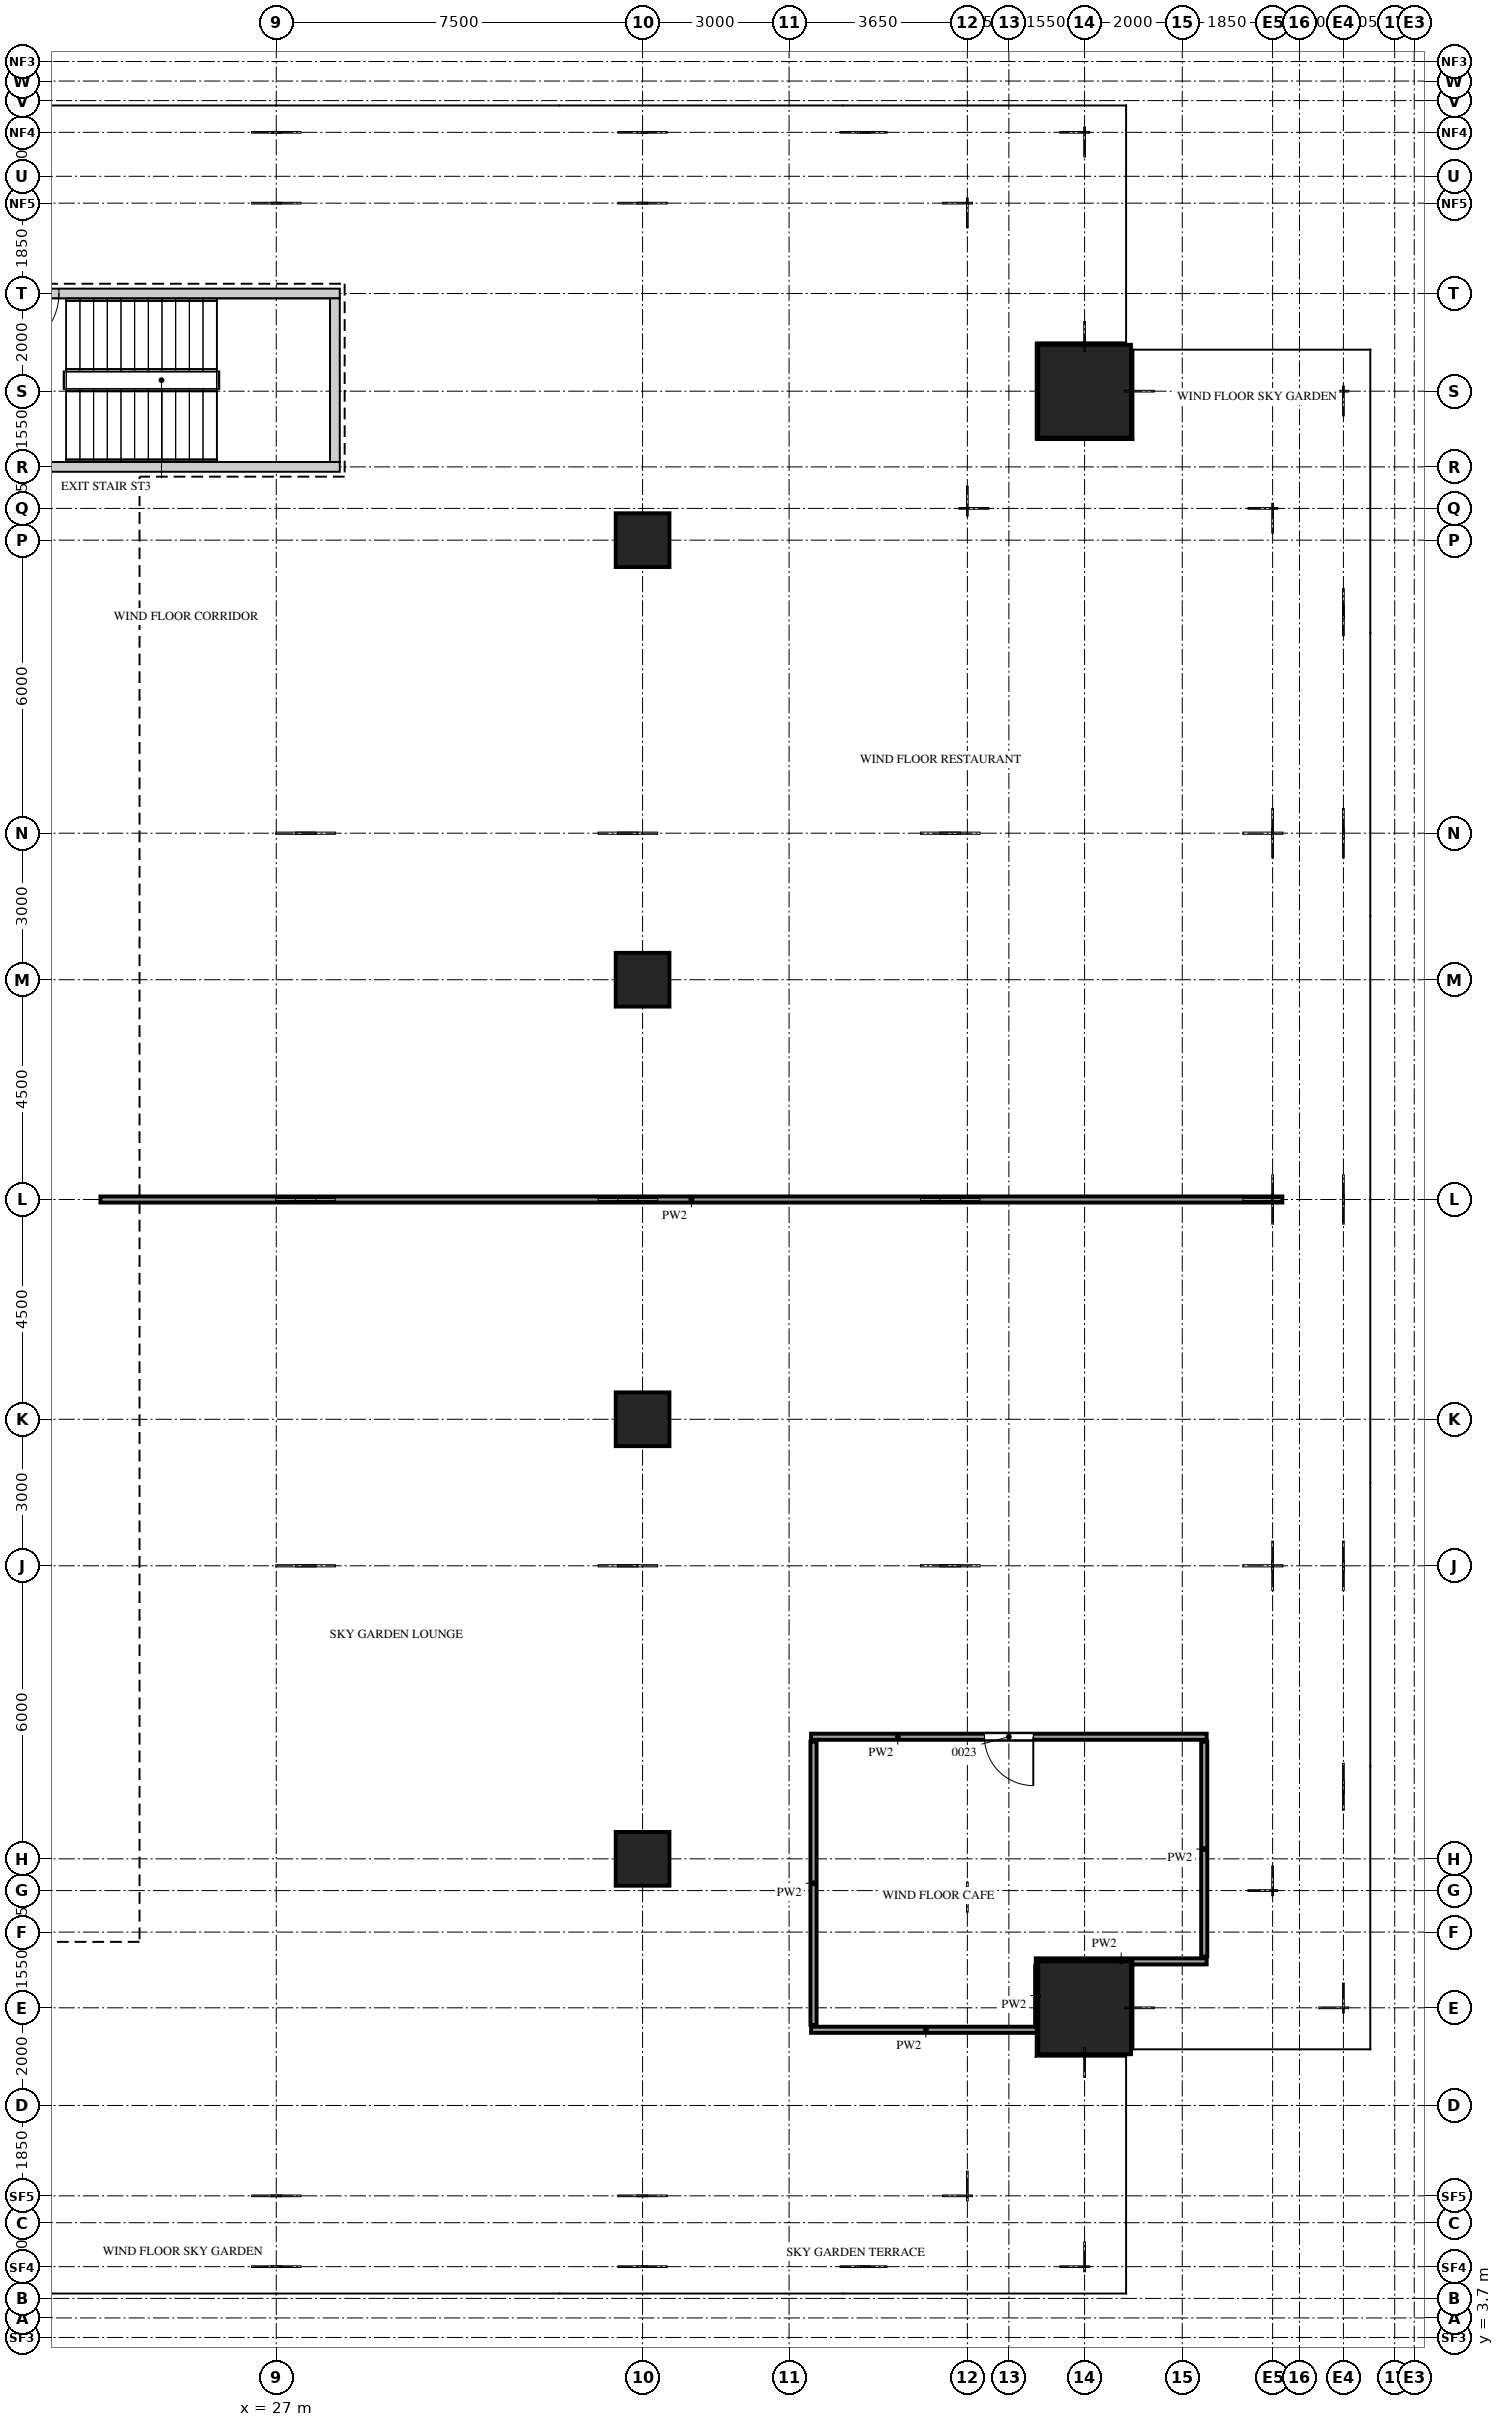
"""IFC4 building model, lengths in metres.
Left out: names, types, materials, properties, quantities, classifications, styles, units other than length and angle.
Written with IfcOpenShell. Run it as: python <this file> out.ifc"""

import sys

from ifc_helpers import new_model, si_unit, direction, frame, frame_2d, origin, origin_2d, place, context, subcontext, project, spatial, rectangle, extrude, source, transform, mapped, element, fill, save


model = new_model("IFC4")
c1 = context("Model", 3, precision=1e-05, world=origin(), true_north=direction((0.0, 1.0)))
c2 = subcontext(c1, "Body", "Model", "MODEL_VIEW")
j1 = project(units=[si_unit("LENGTHUNIT", "METRE"), si_unit("PLANEANGLEUNIT", "RADIAN")], contexts=[c1])
p1 = place(None, origin())
s1 = spatial("IfcSite", under=j1, at=p1, CompositionType="ELEMENT")
p2 = place(p1, origin())
s2 = spatial("IfcBuilding", under=s1, at=p2, CompositionType="ELEMENT")
p3 = place(p2, frame((0.0, 0.0, 274.2)))
s3 = spatial("IfcBuildingStorey", under=s2, at=p3, CompositionType="ELEMENT", Elevation=274.2)
m1 = source(origin(), c2, "Body", "SweptSolid", [
    extrude(rectangle(XDim=7.1, YDim=0.2, at=frame_2d((3.55, 0.0))), origin(), (0.0, 0.0, 1.0), 7.75),
])
p4 = place(p3, frame((21.2, 45.55, 0.0), z_axis=(0.0, 0.0, 1.0), x_axis=(1.0, 0.0, 0.0)))
e1 = element("IfcWall", 1, at=p4, inside=s3, PredefinedType="SHEAR", context=c2, shape_type="MappedRepresentation", body=[
    mapped(m1, transform((0.0, 0.0, 0.0))),
])
m2 = source(origin(), c2, "Body", "SweptSolid", [
    extrude(rectangle(XDim=1.2, YDim=2.1, at=frame_2d((0.6, 1.05))), frame((0.0, 0.11, 0.0), z_axis=(0.0, -1.0, 0.0), x_axis=(1.0, 0.0, 0.0)), (0.0, 0.0, 1.0), 0.22),
])
p5 = place(p4, frame((0.15, 0.0, 0.0)))
e2 = element("IfcOpeningElement", 2, at=p5, cuts=e1, PredefinedType="OPENING", context=c2, shape_type="MappedRepresentation", body=[
    mapped(m2, transform((0.0, 0.0, 0.0))),
])
p6 = place(p3, frame((21.2, 42.0, 0.0), z_axis=(0.0, 0.0, 1.0), x_axis=(1.0, 0.0, 0.0)))
e3 = element("IfcWall", 3, at=p6, inside=s3, PredefinedType="SHEAR", context=c2, shape_type="MappedRepresentation", body=[
    mapped(m1, transform((0.0, 0.0, 0.0))),
])
m3 = source(origin(), c2, "Body", "SweptSolid", [
    extrude(rectangle(XDim=3.35, YDim=0.2, at=frame_2d((1.675, 0.0))), origin(), (0.0, 0.0, 1.0), 7.75),
])
p7 = place(p3, frame((28.2, 42.1, 0.0), z_axis=(0.0, 0.0, 1.0), x_axis=(0.0, 1.0, 0.0)))
e4 = element("IfcWall", 4, at=p7, inside=s3, PredefinedType="SHEAR", context=c2, shape_type="MappedRepresentation", body=[
    mapped(m3, transform((0.0, 0.0, 0.0))),
])
m4 = source(origin(), c2, "Body", "SweptSolid", [
    extrude(rectangle(XDim=1.9, YDim=1.9, at=origin_2d()), origin(), (0.0, 0.0, 1.0), 8.0),
])
for number, where, z_axis, x_axis in (
    (5, (43.55, 43.55, 0.0), (0.0, 0.0, 1.0), (1.0, 0.0, 0.0)),
    (6, (43.55, 10.45, 0.0), (0.0, 0.0, 1.0), (1.0, 0.0, 0.0)),
):
    element("IfcColumn", number, at=place(p3, frame(where, z_axis=z_axis, x_axis=x_axis)), inside=s3, PredefinedType="COLUMN", context=c2, shape_type="MappedRepresentation", body=[
        mapped(m4, transform((0.0, 0.0, 0.0))),
    ])
m5 = source(origin(), c2, "Body", "SweptSolid", [
    extrude(rectangle(XDim=1.1, YDim=1.1, at=origin_2d()), origin(), (0.0, 0.0, 1.0), 7.75),
])
for number, where, z_axis, x_axis in (
    (7, (34.5, 13.5, 0.0), (0.0, 0.0, 1.0), (1.0, 0.0, 0.0)),
    (8, (34.5, 22.5, 0.0), (0.0, 0.0, 1.0), (1.0, 0.0, 0.0)),
    (9, (34.5, 31.5, 0.0), (0.0, 0.0, 1.0), (1.0, 0.0, 0.0)),
    (10, (34.5, 40.5, 0.0), (0.0, 0.0, 1.0), (1.0, 0.0, 0.0)),
):
    element("IfcColumn", number, at=place(p3, frame(where, z_axis=z_axis, x_axis=x_axis)), inside=s3, PredefinedType="COLUMN", context=c2, shape_type="MappedRepresentation", body=[
        mapped(m5, transform((0.0, 0.0, 0.0))),
    ])
m6 = source(origin(), c2, "Body", "SweptSolid", [
    extrude(rectangle(XDim=4.7, YDim=0.125, at=frame_2d((2.35, 0.0))), origin(), (0.0, 0.0, 1.0), 7.75),
])
p8 = place(p3, frame((37.95, 10.0, 0.0), z_axis=(0.0, 0.0, 1.0), x_axis=(1.0, 0.0, 0.0)))
e11 = element("IfcWall", 11, at=p8, inside=s3, PredefinedType="PARTITIONING", context=c2, shape_type="MappedRepresentation", body=[
    mapped(m6, transform((0.0, 0.0, 0.0))),
])
m7 = source(origin(), c2, "Body", "SweptSolid", [
    extrude(rectangle(XDim=5.8, YDim=0.125, at=frame_2d((2.9, 0.0))), origin(), (0.0, 0.0, 1.0), 7.75),
])
p9 = place(p3, frame((38.0, 10.1, 0.0), z_axis=(0.0, 0.0, 1.0), x_axis=(0.0, 1.0, 0.0)))
e12 = element("IfcWall", 12, at=p9, inside=s3, PredefinedType="PARTITIONING", context=c2, shape_type="MappedRepresentation", body=[
    mapped(m7, transform((0.0, 0.0, 0.0))),
])
m8 = source(origin(), c2, "Body", "SweptSolid", [
    extrude(rectangle(XDim=1.2, YDim=0.125, at=frame_2d((0.6, 0.0))), origin(), (0.0, 0.0, 1.0), 7.75),
])
p10 = place(p3, frame((42.6, 10.1, 0.0), z_axis=(0.0, 0.0, 1.0), x_axis=(0.0, 1.0, 0.0)))
e13 = element("IfcWall", 13, at=p10, inside=s3, PredefinedType="PARTITIONING", context=c2, shape_type="MappedRepresentation", body=[
    mapped(m8, transform((0.0, 0.0, 0.0))),
])
m9 = source(origin(), c2, "Body", "SweptSolid", [
    extrude(rectangle(XDim=3.5, YDim=0.125, at=frame_2d((1.75, 0.0))), origin(), (0.0, 0.0, 1.0), 7.75),
])
p11 = place(p3, frame((42.55, 11.4, 0.0), z_axis=(0.0, 0.0, 1.0), x_axis=(1.0, 0.0, 0.0)))
e14 = element("IfcWall", 14, at=p11, inside=s3, PredefinedType="PARTITIONING", context=c2, shape_type="MappedRepresentation", body=[
    mapped(m9, transform((0.0, 0.0, 0.0))),
])
m10 = source(origin(), c2, "Body", "SweptSolid", [
    extrude(rectangle(XDim=4.4, YDim=0.125, at=frame_2d((2.2, 0.0))), origin(), (0.0, 0.0, 1.0), 7.75),
])
p12 = place(p3, frame((46.0, 11.5, 0.0), z_axis=(0.0, 0.0, 1.0), x_axis=(0.0, 1.0, 0.0)))
e15 = element("IfcWall", 15, at=p12, inside=s3, PredefinedType="PARTITIONING", context=c2, shape_type="MappedRepresentation", body=[
    mapped(m10, transform((0.0, 0.0, 0.0))),
])
m11 = source(origin(), c2, "Body", "SweptSolid", [
    extrude(rectangle(XDim=8.1, YDim=0.125, at=frame_2d((4.05, 0.0))), origin(), (0.0, 0.0, 1.0), 7.75),
])
p13 = place(p3, frame((37.95, 16.0, 0.0), z_axis=(0.0, 0.0, 1.0), x_axis=(1.0, 0.0, 0.0)))
e16 = element("IfcWall", 16, at=p13, inside=s3, PredefinedType="PARTITIONING", context=c2, shape_type="MappedRepresentation", body=[
    mapped(m11, transform((0.0, 0.0, 0.0))),
])
m12 = source(origin(), c2, "Body", "SweptSolid", [
    extrude(rectangle(XDim=1.0, YDim=2.1, at=frame_2d((0.5, 1.05))), frame((0.0, 0.073, 0.0), z_axis=(0.0, -1.0, 0.0), x_axis=(1.0, 0.0, 0.0)), (0.0, 0.0, 1.0), 0.145),
])
p14 = place(p13, frame((3.55, 0.0, 0.0)))
e17 = element("IfcOpeningElement", 17, at=p14, cuts=e16, PredefinedType="OPENING", context=c2, shape_type="MappedRepresentation", body=[
    mapped(m12, transform((0.0, 0.0, 0.0))),
])
m13 = source(origin(), c2, "Body", "SweptSolid", [
    extrude(rectangle(XDim=24.2, YDim=0.125, at=frame_2d((12.1, 0.0))), origin(), (0.0, 0.0, 1.0), 7.75),
])
p15 = place(p3, frame((23.4, 27.0, 0.0), z_axis=(0.0, 0.0, 1.0), x_axis=(1.0, 0.0, 0.0)))
e18 = element("IfcWall", 18, at=p15, inside=s3, PredefinedType="PARTITIONING", context=c2, shape_type="MappedRepresentation", body=[
    mapped(m13, transform((0.0, 0.0, 0.0))),
])
m14 = source(origin(), c2, "Body", "SweptSolid", [
    extrude(rectangle(XDim=1.0, YDim=2.1, at=frame_2d((0.5, 1.05))), frame((0.0, 0.025, 0.0), z_axis=(0.0, -1.0, 0.0), x_axis=(1.0, 0.0, 0.0)), (0.0, 0.0, 1.0), 0.05),
])
p16 = place(p14, origin())
e19 = element("IfcDoor", 19, at=p16, inside=s3, OperationType="SINGLE_SWING_RIGHT", PredefinedType="DOOR", context=c2, shape_type="MappedRepresentation", body=[
    mapped(m14, transform((0.0, 0.0, 0.0))),
])
fill(e17, e19)
m15 = source(origin(), c2, "Body", "SweptSolid", [
    extrude(rectangle(XDim=1.2, YDim=2.1, at=frame_2d((0.6, 1.05))), frame((0.0, 0.025, 0.0), z_axis=(0.0, -1.0, 0.0), x_axis=(1.0, 0.0, 0.0)), (0.0, 0.0, 1.0), 0.05),
])
p17 = place(p5, origin())
e20 = element("IfcDoor", 20, at=p17, inside=s3, OperationType="SINGLE_SWING_LEFT", PredefinedType="DOOR", context=c2, shape_type="MappedRepresentation", body=[
    mapped(m15, transform((0.0, 0.0, 0.0))),
])
fill(e2, e20)
save(model, sys.argv[1])
